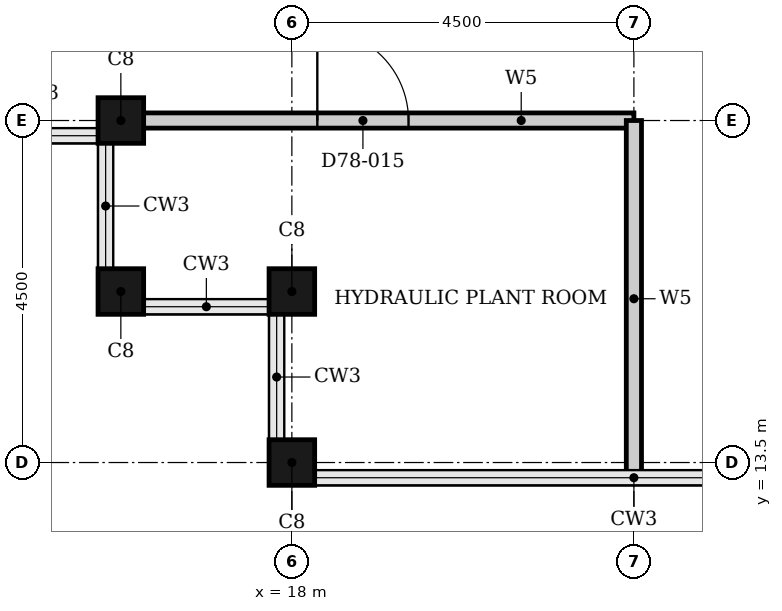
"""IFC4 building model, lengths in metres.
Left out: names, types, materials, properties, quantities, classifications, styles, units other than length and angle.
Written with IfcOpenShell. Run it as: python <this file> out.ifc"""

import sys

from ifc_helpers import new_model, si_unit, direction, frame, frame_2d, origin, origin_2d, place, context, subcontext, project, spatial, rectangle, hollow_rectangle, extrude, element, fill, save


model = new_model("IFC4")
c1 = context("Model", 3, precision=1e-05, world=origin(), true_north=direction((0.0, 1.0)))
c2 = subcontext(c1, "Body", "Model", "MODEL_VIEW")
j1 = project(units=[si_unit("LENGTHUNIT", "METRE"), si_unit("PLANEANGLEUNIT", "RADIAN")], contexts=[c1])
p1 = place(None, origin())
s1 = spatial("IfcSite", under=j1, at=p1, CompositionType="ELEMENT")
p2 = place(p1, origin())
s2 = spatial("IfcBuilding", under=s1, at=p2, CompositionType="ELEMENT")
p3 = place(p2, frame((0.0, 0.0, 305.6)))
s3 = spatial("IfcBuildingStorey", under=s2, at=p3, CompositionType="ELEMENT", Elevation=305.6)
for number, where, z_axis, x_axis in (
    (1, (15.75, 18.0, 0.0), (0.0, 0.0, 1.0), (1.0, 0.0, 0.0)),
    (2, (15.75, 15.75, 0.0), (0.0, 0.0, 1.0), (1.0, 0.0, 0.0)),
    (3, (18.0, 15.75, 0.0), (0.0, 0.0, 1.0), (1.0, 0.0, 0.0)),
    (4, (18.0, 13.5, 0.0), (0.0, 0.0, 1.0), (1.0, 0.0, 0.0)),
):
    element("IfcColumn", number, at=place(p3, frame(where, z_axis=z_axis, x_axis=x_axis)), inside=s3, PredefinedType="COLUMN", context=c2, shape_type="SweptSolid", body=[
        extrude(hollow_rectangle(XDim=0.6, YDim=0.6, WallThickness=0.02, at=origin_2d()), origin(), (0.0, 0.0, 1.0), 7.2),
    ])
p4 = place(p3, frame((15.56, 18.0, 0.0), z_axis=(0.0, 0.0, 1.0), x_axis=(1.0, 0.0, 0.0)))
e5 = element("IfcWall", 5, at=p4, inside=s3, PredefinedType="PARTITIONING", context=c2, shape_type="SweptSolid", body=[
    extrude(rectangle(XDim=6.94, YDim=0.2, at=frame_2d((3.47, 0.0))), origin(), (0.0, 0.0, 1.0), 6.18),
])
p5 = place(p4, frame((2.775, 0.0, 0.0)))
e6 = element("IfcOpeningElement", 6, at=p5, cuts=e5, PredefinedType="OPENING", context=c2, shape_type="SweptSolid", body=[
    extrude(rectangle(XDim=1.2, YDim=2.1, at=frame_2d((0.6, 1.05))), frame((0.0, 0.11, 0.0), z_axis=(0.0, -1.0, 0.0), x_axis=(1.0, 0.0, 0.0)), (0.0, 0.0, 1.0), 0.22),
])
p6 = place(p3, frame((22.5, 13.31, 0.0), z_axis=(0.0, 0.0, 1.0), x_axis=(0.0, 1.0, 0.0)))
e7 = element("IfcWall", 7, at=p6, inside=s3, PredefinedType="PARTITIONING", context=c2, shape_type="SweptSolid", body=[
    extrude(rectangle(XDim=4.69, YDim=0.2, at=frame_2d((2.345, 0.0))), origin(), (0.0, 0.0, 1.0), 5.968),
])
p7 = place(p5, origin())
e8 = element("IfcDoor", 8, at=p7, inside=s3, OperationType="SINGLE_SWING_LEFT", PredefinedType="DOOR", context=c2, shape_type="SweptSolid", body=[
    extrude(rectangle(XDim=1.2, YDim=2.1, at=frame_2d((0.6, 1.05))), frame((0.0, 0.025, 0.0), z_axis=(0.0, -1.0, 0.0), x_axis=(1.0, 0.0, 0.0)), (0.0, 0.0, 1.0), 0.05),
])
fill(e6, e8)
save(model, sys.argv[1])
